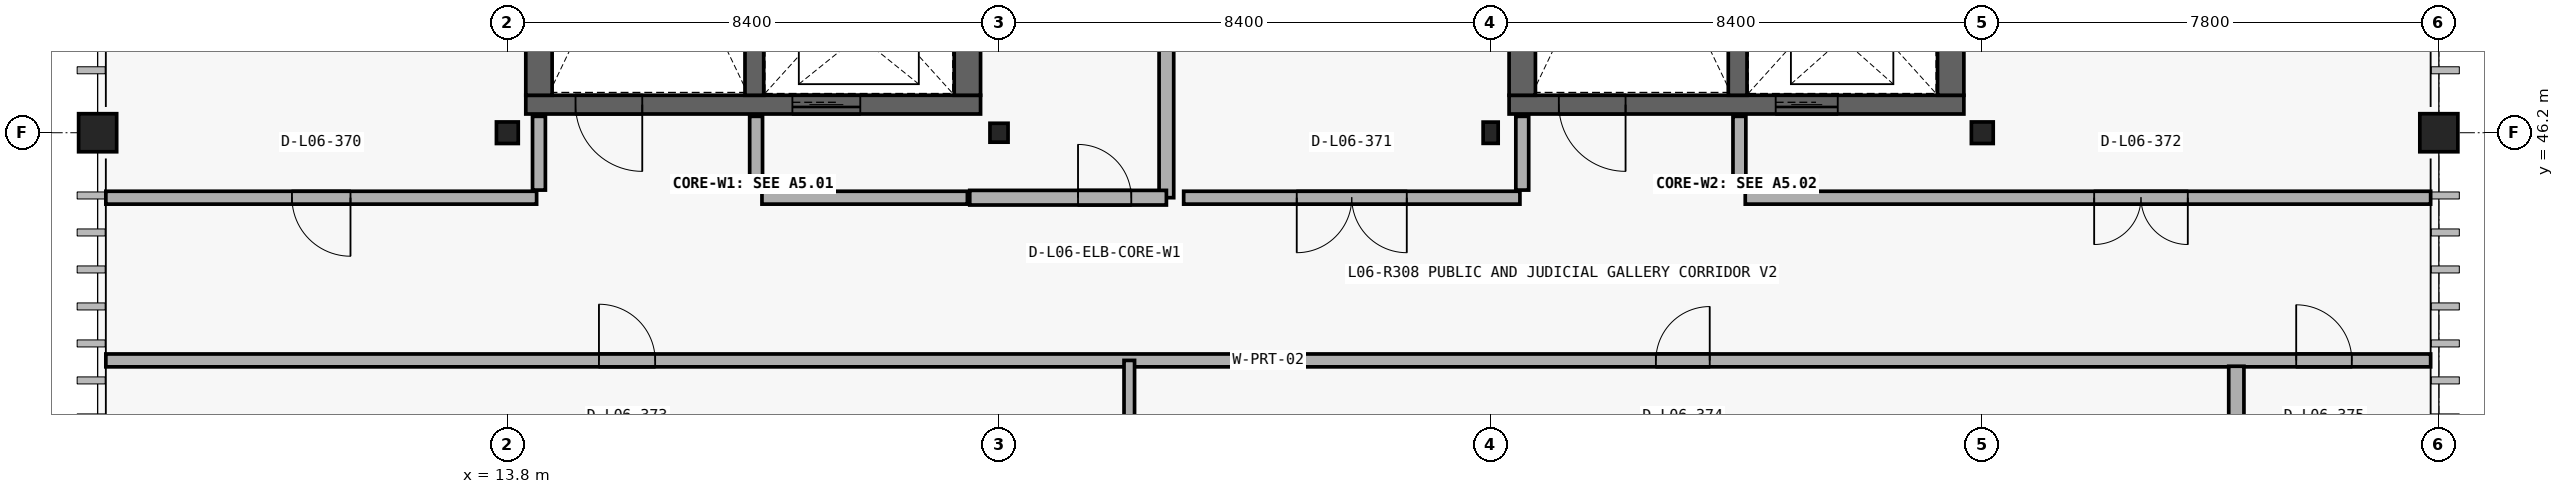
"""IFC4 building model, lengths in metres.
Left out: names, types, materials, properties, quantities, classifications, styles, units other than length and angle.
Written with IfcOpenShell. Run it as: python <this file> out.ifc"""

import sys

from ifc_helpers import new_model, si_unit, direction, frame, frame_2d, origin_with_axes, origin_2d_with_axis, place, context, subcontext, project, spatial, rectangle, circle, i_section, extrude, element, fill, save


model = new_model("IFC4")
c1 = context("Model", 3, precision=1e-05, world=origin_with_axes(), true_north=direction((0.0, 1.0)))
c2 = subcontext(c1, "Body", "Model", "MODEL_VIEW")
j1 = project(units=[si_unit("LENGTHUNIT", "METRE"), si_unit("PLANEANGLEUNIT", "RADIAN")], contexts=[c1])
p1 = place(None, origin_with_axes())
s1 = spatial("IfcSite", under=j1, at=p1, CompositionType="ELEMENT")
p2 = place(p1, origin_with_axes())
s2 = spatial("IfcBuilding", under=s1, at=p2, CompositionType="ELEMENT")
p3 = place(p2, frame((0.0, 0.0, 29.7), z_axis=(0.0, 0.0, 1.0), x_axis=(1.0, 0.0, 0.0)))
s3 = spatial("IfcBuildingStorey", under=s2, at=p3, CompositionType="ELEMENT", Elevation=29.7)
p4 = place(None, frame((14.115, 46.68, 29.7), z_axis=(0.0, 0.0, 1.0), x_axis=(1.0, 0.0, 0.0)))
e1 = element("IfcWall", 1, at=p4, inside=s3, PredefinedType="SHEAR", context=c2, shape_type="SweptSolid", body=[
    extrude(rectangle(XDim=7.77, YDim=0.32, at=frame_2d((3.885, 0.0), x_axis=(1.0, 0.0))), origin_with_axes(), (0.0, 0.0, 1.0), 4.8),
])
p5 = place(None, frame((15.535, 46.68, 29.7), z_axis=(0.0, 0.0, 1.0), x_axis=(1.0, 0.0, 0.0)))
e2 = element("IfcOpeningElement", 2, at=p5, cuts=e1, PredefinedType="OPENING", context=c2, shape_type="SweptSolid", body=[
    extrude(rectangle(XDim=1.14, YDim=2.18, at=frame_2d((0.0, 1.09), x_axis=(1.0, 0.0))), frame((0.0, 0.17, 0.0), z_axis=(0.0, -1.0, 0.0), x_axis=(1.0, 0.0, 0.0)), (0.0, 0.0, 1.0), 0.34),
])
p6 = place(None, frame((19.25, 46.68, 29.7), z_axis=(0.0, 0.0, 1.0), x_axis=(1.0, 0.0, 0.0)))
e3 = element("IfcOpeningElement", 3, at=p6, cuts=e1, PredefinedType="OPENING", context=c2, shape_type="SweptSolid", body=[
    extrude(rectangle(XDim=1.16, YDim=2.2, at=frame_2d((0.0, 1.1), x_axis=(1.0, 0.0))), frame((0.0, 0.17, 0.0), z_axis=(0.0, -1.0, 0.0), x_axis=(1.0, 0.0, 0.0)), (0.0, 0.0, 1.0), 0.34),
])
p7 = place(None, frame((21.66, 46.84, 29.7), z_axis=(0.0, 0.0, 1.0), x_axis=(0.0, 1.0, 0.0)))
e4 = element("IfcWall", 4, at=p7, inside=s3, PredefinedType="SHEAR", context=c2, shape_type="SweptSolid", body=[
    extrude(rectangle(XDim=7.12, YDim=0.45, at=frame_2d((3.56, 0.0), x_axis=(1.0, 0.0))), origin_with_axes(), (0.0, 0.0, 1.0), 4.8),
])
p8 = place(None, frame((21.66, 52.69, 29.7), z_axis=(0.0, 0.0, 1.0), x_axis=(0.0, 1.0, 0.0)))
e5 = element("IfcOpeningElement", 5, at=p8, cuts=e4, PredefinedType="OPENING", context=c2, shape_type="SweptSolid", body=[
    extrude(rectangle(XDim=1.16, YDim=2.2, at=frame_2d((0.0, 1.1), x_axis=(1.0, 0.0))), frame((0.0, 0.235, 0.0), z_axis=(0.0, -1.0, 0.0), x_axis=(1.0, 0.0, 0.0)), (0.0, 0.0, 1.0), 0.47),
])
p9 = place(None, frame((14.34, 53.96, 29.7), z_axis=(0.0, 0.0, 1.0), x_axis=(0.0, -1.0, 0.0)))
e6 = element("IfcWall", 6, at=p9, inside=s3, PredefinedType="SHEAR", context=c2, shape_type="SweptSolid", body=[
    extrude(rectangle(XDim=7.12, YDim=0.45, at=frame_2d((3.56, 0.0), x_axis=(1.0, 0.0))), origin_with_axes(), (0.0, 0.0, 1.0), 4.8),
])
p10 = place(None, frame((18.02, 46.84, 29.7), z_axis=(0.0, 0.0, 1.0), x_axis=(0.0, 1.0, 0.0)))
e7 = element("IfcWall", 7, at=p10, inside=s3, PredefinedType="SHEAR", context=c2, shape_type="SweptSolid", body=[
    extrude(rectangle(XDim=7.12, YDim=0.32, at=frame_2d((3.56, 0.0), x_axis=(1.0, 0.0))), origin_with_axes(), (0.0, 0.0, 1.0), 4.8),
])
p11 = place(None, frame((25.06, 45.09, 29.7), z_axis=(0.0, 0.0, 1.0), x_axis=(0.0, 1.0, 0.0)))
e8 = element("IfcWall", 8, at=p11, inside=s3, PredefinedType="PARTITIONING", context=c2, shape_type="SweptSolid", body=[
    extrude(rectangle(XDim=9.03, YDim=0.25, at=frame_2d((4.515, 0.0), x_axis=(1.0, 0.0))), origin_with_axes(), (0.0, 0.0, 1.0), 4.48),
])
p12 = place(None, frame((21.7, 45.09, 29.7), z_axis=(0.0, 0.0, 1.0), x_axis=(1.0, 0.0, 0.0)))
e9 = element("IfcWall", 9, at=p12, inside=s3, PredefinedType="PARTITIONING", context=c2, shape_type="SweptSolid", body=[
    extrude(rectangle(XDim=3.36, YDim=0.25, at=frame_2d((1.68, 0.0), x_axis=(1.0, 0.0))), origin_with_axes(), (0.0, 0.0, 1.0), 4.48),
])
p13 = place(None, frame((24.005, 45.09, 29.7), z_axis=(0.0, 0.0, 1.0), x_axis=(1.0, 0.0, 0.0)))
e10 = element("IfcOpeningElement", 10, at=p13, cuts=e9, PredefinedType="OPENING", context=c2, shape_type="SweptSolid", body=[
    extrude(rectangle(XDim=0.91, YDim=2.12, at=frame_2d((0.0, 1.06), x_axis=(1.0, 0.0))), frame((0.0, 0.135, 0.0), z_axis=(0.0, -1.0, 0.0), x_axis=(1.0, 0.0, 0.0)), (0.0, 0.0, 1.0), 0.27),
])
p14 = place(None, frame((30.915, 46.68, 29.7), z_axis=(0.0, 0.0, 1.0), x_axis=(1.0, 0.0, 0.0)))
e11 = element("IfcWall", 11, at=p14, inside=s3, PredefinedType="SHEAR", context=c2, shape_type="SweptSolid", body=[
    extrude(rectangle(XDim=7.77, YDim=0.32, at=frame_2d((3.885, 0.0), x_axis=(1.0, 0.0))), origin_with_axes(), (0.0, 0.0, 1.0), 4.8),
])
p15 = place(None, frame((32.335, 46.68, 29.7), z_axis=(0.0, 0.0, 1.0), x_axis=(1.0, 0.0, 0.0)))
e12 = element("IfcOpeningElement", 12, at=p15, cuts=e11, PredefinedType="OPENING", context=c2, shape_type="SweptSolid", body=[
    extrude(rectangle(XDim=1.14, YDim=2.18, at=frame_2d((0.0, 1.09), x_axis=(1.0, 0.0))), frame((0.0, 0.17, 0.0), z_axis=(0.0, -1.0, 0.0), x_axis=(1.0, 0.0, 0.0)), (0.0, 0.0, 1.0), 0.34),
])
p16 = place(None, frame((36.0, 46.68, 29.7), z_axis=(0.0, 0.0, 1.0), x_axis=(1.0, 0.0, 0.0)))
e13 = element("IfcOpeningElement", 13, at=p16, cuts=e11, PredefinedType="OPENING", context=c2, shape_type="SweptSolid", body=[
    extrude(rectangle(XDim=1.06, YDim=2.16, at=frame_2d((0.0, 1.08), x_axis=(1.0, 0.0))), frame((0.0, 0.17, 0.0), z_axis=(0.0, -1.0, 0.0), x_axis=(1.0, 0.0, 0.0)), (0.0, 0.0, 1.0), 0.34),
])
for number, where, z_axis, x_axis in (
    (14, (38.46, 46.84, 29.7), (0.0, 0.0, 1.0), (0.0, 1.0, 0.0)),
    (15, (31.14, 53.96, 29.7), (0.0, 0.0, 1.0), (0.0, -1.0, 0.0)),
):
    element("IfcWall", number, at=place(None, frame(where, z_axis=z_axis, x_axis=x_axis)), inside=s3, PredefinedType="SHEAR", context=c2, shape_type="SweptSolid", body=[
        extrude(rectangle(XDim=7.12, YDim=0.45, at=frame_2d((3.56, 0.0), x_axis=(1.0, 0.0))), origin_with_axes(), (0.0, 0.0, 1.0), 4.8),
    ])
p17 = place(None, frame((34.82, 46.84, 29.7), z_axis=(0.0, 0.0, 1.0), x_axis=(0.0, 1.0, 0.0)))
e16 = element("IfcWall", 16, at=p17, inside=s3, PredefinedType="SHEAR", context=c2, shape_type="SweptSolid", body=[
    extrude(rectangle(XDim=7.12, YDim=0.32, at=frame_2d((3.56, 0.0), x_axis=(1.0, 0.0))), origin_with_axes(), (0.0, 0.0, 1.0), 4.8),
])
for number, where, z_axis, x_axis in (
    (17, (14.34, 45.22, 29.7), (0.0, 0.0, 1.0), (0.0, 1.0, 0.0)),
    (18, (18.05, 45.22, 29.7), (0.0, 0.0, 1.0), (0.0, 1.0, 0.0)),
    (19, (31.14, 45.22, 29.7), (0.0, 0.0, 1.0), (0.0, 1.0, 0.0)),
    (20, (34.85, 45.22, 29.7), (0.0, 0.0, 1.0), (0.0, 1.0, 0.0)),
):
    element("IfcWall", number, at=place(None, frame(where, z_axis=z_axis, x_axis=x_axis)), inside=s3, PredefinedType="PARTITIONING", context=c2, shape_type="SweptSolid", body=[
        extrude(rectangle(XDim=1.26, YDim=0.22, at=frame_2d((0.63, 0.0), x_axis=(1.0, 0.0))), origin_with_axes(), (0.0, 0.0, 1.0), 4.48),
    ])
p18 = place(None, frame((6.94, 45.09, 29.7), z_axis=(0.0, 0.0, 1.0), x_axis=(1.0, 0.0, 0.0)))
e21 = element("IfcWall", 21, at=p18, inside=s3, PredefinedType="PARTITIONING", context=c2, shape_type="SweptSolid", body=[
    extrude(rectangle(XDim=7.36, YDim=0.22, at=frame_2d((3.68, 0.0), x_axis=(1.0, 0.0))), origin_with_axes(), (0.0, 0.0, 1.0), 4.48),
])
p19 = place(None, frame((10.62, 45.09, 29.7), z_axis=(0.0, 0.0, 1.0), x_axis=(1.0, 0.0, 0.0)))
e22 = element("IfcOpeningElement", 22, at=p19, cuts=e21, PredefinedType="OPENING", context=c2, shape_type="SweptSolid", body=[
    extrude(rectangle(XDim=1.0, YDim=2.28, at=frame_2d((0.0, 1.14), x_axis=(1.0, 0.0))), frame((0.0, 0.12, 0.0), z_axis=(0.0, -1.0, 0.0), x_axis=(1.0, 0.0, 0.0)), (0.0, 0.0, 1.0), 0.24),
])
p20 = place(None, frame((18.15, 45.09, 29.7), z_axis=(0.0, 0.0, 1.0), x_axis=(1.0, 0.0, 0.0)))
e23 = element("IfcWall", 23, at=p20, inside=s3, PredefinedType="PARTITIONING", context=c2, shape_type="SweptSolid", body=[
    extrude(rectangle(XDim=3.51, YDim=0.22, at=frame_2d((1.755, 0.0), x_axis=(1.0, 0.0))), origin_with_axes(), (0.0, 0.0, 1.0), 4.48),
])
p21 = place(None, frame((25.355, 45.09, 29.7), z_axis=(0.0, 0.0, 1.0), x_axis=(1.0, 0.0, 0.0)))
e24 = element("IfcWall", 24, at=p21, inside=s3, PredefinedType="PARTITIONING", context=c2, shape_type="SweptSolid", body=[
    extrude(rectangle(XDim=5.745, YDim=0.22, at=frame_2d((2.873, 0.0), x_axis=(1.0, 0.0))), origin_with_axes(), (0.0, 0.0, 1.0), 4.48),
])
p22 = place(None, frame((28.227, 45.09, 29.7), z_axis=(0.0, 0.0, 1.0), x_axis=(1.0, 0.0, 0.0)))
e25 = element("IfcOpeningElement", 25, at=p22, cuts=e24, PredefinedType="OPENING", context=c2, shape_type="SweptSolid", body=[
    extrude(rectangle(XDim=1.88, YDim=2.56, at=frame_2d((0.0, 1.28), x_axis=(1.0, 0.0))), frame((0.0, 0.12, 0.0), z_axis=(0.0, -1.0, 0.0), x_axis=(1.0, 0.0, 0.0)), (0.0, 0.0, 1.0), 0.24),
])
p23 = place(None, frame((34.95, 45.09, 29.7), z_axis=(0.0, 0.0, 1.0), x_axis=(1.0, 0.0, 0.0)))
e26 = element("IfcWall", 26, at=p23, inside=s3, PredefinedType="PARTITIONING", context=c2, shape_type="SweptSolid", body=[
    extrude(rectangle(XDim=11.71, YDim=0.22, at=frame_2d((5.855, 0.0), x_axis=(1.0, 0.0))), origin_with_axes(), (0.0, 0.0, 1.0), 4.48),
])
p24 = place(None, frame((41.711, 45.09, 29.7), z_axis=(0.0, 0.0, 1.0), x_axis=(1.0, 0.0, 0.0)))
e27 = element("IfcOpeningElement", 27, at=p24, cuts=e26, PredefinedType="OPENING", context=c2, shape_type="SweptSolid", body=[
    extrude(rectangle(XDim=1.6, YDim=2.32, at=frame_2d((0.0, 1.16), x_axis=(1.0, 0.0))), frame((0.0, 0.12, 0.0), z_axis=(0.0, -1.0, 0.0), x_axis=(1.0, 0.0, 0.0)), (0.0, 0.0, 1.0), 0.24),
])
p25 = place(None, frame((6.94, 42.31, 29.7), z_axis=(0.0, 0.0, 1.0), x_axis=(1.0, 0.0, 0.0)))
e28 = element("IfcWall", 28, at=p25, inside=s3, PredefinedType="PARTITIONING", context=c2, shape_type="SweptSolid", body=[
    extrude(rectangle(XDim=39.72, YDim=0.22, at=frame_2d((19.86, 0.0), x_axis=(1.0, 0.0))), origin_with_axes(), (0.0, 0.0, 1.0), 4.48),
])
p26 = place(None, frame((15.845, 42.31, 29.7), z_axis=(0.0, 0.0, 1.0), x_axis=(1.0, 0.0, 0.0)))
e29 = element("IfcOpeningElement", 29, at=p26, cuts=e28, PredefinedType="OPENING", context=c2, shape_type="SweptSolid", body=[
    extrude(rectangle(XDim=0.96, YDim=2.2, at=frame_2d((0.0, 1.1), x_axis=(1.0, 0.0))), frame((0.0, 0.12, 0.0), z_axis=(0.0, -1.0, 0.0), x_axis=(1.0, 0.0, 0.0)), (0.0, 0.0, 1.0), 0.24),
])
p27 = place(None, frame((33.883, 42.31, 29.7), z_axis=(0.0, 0.0, 1.0), x_axis=(1.0, 0.0, 0.0)))
e30 = element("IfcOpeningElement", 30, at=p27, cuts=e28, PredefinedType="OPENING", context=c2, shape_type="SweptSolid", body=[
    extrude(rectangle(XDim=0.92, YDim=2.14, at=frame_2d((0.0, 1.07), x_axis=(1.0, 0.0))), frame((0.0, 0.12, 0.0), z_axis=(0.0, -1.0, 0.0), x_axis=(1.0, 0.0, 0.0)), (0.0, 0.0, 1.0), 0.24),
])
p28 = place(None, frame((44.838, 42.31, 29.7), z_axis=(0.0, 0.0, 1.0), x_axis=(1.0, 0.0, 0.0)))
e31 = element("IfcOpeningElement", 31, at=p28, cuts=e28, PredefinedType="OPENING", context=c2, shape_type="SweptSolid", body=[
    extrude(rectangle(XDim=0.95, YDim=2.1, at=frame_2d((0.0, 1.05), x_axis=(1.0, 0.0))), frame((0.0, 0.12, 0.0), z_axis=(0.0, -1.0, 0.0), x_axis=(1.0, 0.0, 0.0)), (0.0, 0.0, 1.0), 0.24),
])
p29 = place(None, frame((43.34, 30.78, 29.7), z_axis=(0.0, 0.0, 1.0), x_axis=(0.0, 1.0, 0.0)))
e32 = element("IfcWall", 32, at=p29, inside=s3, PredefinedType="PLUMBINGWALL", context=c2, shape_type="SweptSolid", body=[
    extrude(rectangle(XDim=11.43, YDim=0.26, at=frame_2d((5.715, 0.0), x_axis=(1.0, 0.0))), origin_with_axes(), (0.0, 0.0, 1.0), 4.48),
])
p30 = place(None, frame((24.426, 30.74, 29.7), z_axis=(0.0, 0.0, 1.0), x_axis=(0.0, 1.0, 0.0)))
e33 = element("IfcWall", 33, at=p30, inside=s3, PredefinedType="PARTITIONING", context=c2, shape_type="SweptSolid", body=[
    extrude(rectangle(XDim=11.57, YDim=0.18, at=frame_2d((5.785, 0.0), x_axis=(1.0, 0.0))), origin_with_axes(), (0.0, 0.0, 1.0), 4.48),
])
p31 = place(None, frame((6.8, 46.2, 29.7), z_axis=(0.0, 0.0, 1.0), x_axis=(1.0, 0.0, 0.0)))
e34 = element("IfcColumn", 34, at=p31, inside=s3, PredefinedType="COLUMN", context=c2, shape_type="SweptSolid", body=[
    extrude(circle(Radius=0.325, at=origin_2d_with_axis()), origin_with_axes(), (0.0, 0.0, 1.0), 4.8),
])
p32 = place(None, frame((13.8, 46.2, 29.7), z_axis=(0.0, 0.0, 1.0), x_axis=(1.0, 0.0, 0.0)))
e35 = element("IfcColumn", 35, at=p32, inside=s3, PredefinedType="COLUMN", context=c2, shape_type="SweptSolid", body=[
    extrude(i_section(OverallWidth=0.373, OverallDepth=0.368, WebThickness=0.015, FlangeThickness=0.024, at=origin_2d_with_axis()), origin_with_axes(), (0.0, 0.0, 1.0), 4.8),
])
p33 = place(None, frame((22.2, 46.2, 29.7), z_axis=(0.0, 0.0, 1.0), x_axis=(1.0, 0.0, 0.0)))
e36 = element("IfcColumn", 36, at=p33, inside=s3, PredefinedType="COLUMN", context=c2, shape_type="SweptSolid", body=[
    extrude(i_section(OverallWidth=0.309, OverallDepth=0.323, WebThickness=0.014, FlangeThickness=0.023, at=origin_2d_with_axis()), origin_with_axes(), (0.0, 0.0, 1.0), 4.8),
])
p34 = place(None, frame((30.6, 46.2, 29.7), z_axis=(0.0, 0.0, 1.0), x_axis=(1.0, 0.0, 0.0)))
e37 = element("IfcColumn", 37, at=p34, inside=s3, PredefinedType="COLUMN", context=c2, shape_type="SweptSolid", body=[
    extrude(i_section(OverallWidth=0.257, OverallDepth=0.363, WebThickness=0.013, FlangeThickness=0.022, at=origin_2d_with_axis()), origin_with_axes(), (0.0, 0.0, 1.0), 4.8),
])
p35 = place(None, frame((39.0, 46.2, 29.7), z_axis=(0.0, 0.0, 1.0), x_axis=(1.0, 0.0, 0.0)))
e38 = element("IfcColumn", 38, at=p35, inside=s3, PredefinedType="COLUMN", context=c2, shape_type="SweptSolid", body=[
    extrude(i_section(OverallWidth=0.373, OverallDepth=0.368, WebThickness=0.015, FlangeThickness=0.024, at=origin_2d_with_axis()), origin_with_axes(), (0.0, 0.0, 1.0), 4.8),
])
p36 = place(None, frame((46.8, 46.2, 29.7), z_axis=(0.0, 0.0, 1.0), x_axis=(1.0, 0.0, 0.0)))
e39 = element("IfcColumn", 39, at=p36, inside=s3, PredefinedType="COLUMN", context=c2, shape_type="SweptSolid", body=[
    extrude(circle(Radius=0.325, at=origin_2d_with_axis()), origin_with_axes(), (0.0, 0.0, 1.0), 4.8),
])
p37 = place(None, frame((15.535, 46.68, 29.7), z_axis=(0.0, 0.0, 1.0), x_axis=(-1.0, 0.0, 0.0)))
e40 = element("IfcDoor", 40, at=p37, inside=s3, OperationType="SINGLE_SWING_RIGHT", PredefinedType="DOOR", context=c2, shape_type="SweptSolid", body=[
    extrude(rectangle(XDim=1.14, YDim=2.18, at=frame_2d((0.0, 1.09), x_axis=(1.0, 0.0))), frame((0.0, 0.04, 0.0), z_axis=(0.0, -1.0, 0.0), x_axis=(1.0, 0.0, 0.0)), (0.0, 0.0, 1.0), 0.08),
])
fill(e2, e40)
p38 = place(None, frame((19.25, 46.68, 29.7), z_axis=(0.0, 0.0, 1.0), x_axis=(-1.0, 0.0, 0.0)))
e41 = element("IfcDoor", 41, at=p38, inside=s3, OperationType="SLIDING_TO_LEFT", PredefinedType="DOOR", context=c2, shape_type="SweptSolid", body=[
    extrude(rectangle(XDim=1.16, YDim=2.2, at=frame_2d((0.0, 1.1), x_axis=(1.0, 0.0))), frame((0.0, 0.04, 0.0), z_axis=(0.0, -1.0, 0.0), x_axis=(1.0, 0.0, 0.0)), (0.0, 0.0, 1.0), 0.08),
])
fill(e3, e41)
p39 = place(None, frame((24.005, 45.09, 29.7), z_axis=(0.0, 0.0, 1.0), x_axis=(1.0, 0.0, 0.0)))
e42 = element("IfcDoor", 42, at=p39, inside=s3, OperationType="SINGLE_SWING_LEFT", PredefinedType="DOOR", context=c2, shape_type="SweptSolid", body=[
    extrude(rectangle(XDim=0.91, YDim=2.12, at=frame_2d((0.0, 1.06), x_axis=(1.0, 0.0))), frame((0.0, 0.04, 0.0), z_axis=(0.0, -1.0, 0.0), x_axis=(1.0, 0.0, 0.0)), (0.0, 0.0, 1.0), 0.08),
])
fill(e10, e42)
p40 = place(None, frame((32.335, 46.68, 29.7), z_axis=(0.0, 0.0, 1.0), x_axis=(-1.0, 0.0, 0.0)))
e43 = element("IfcDoor", 43, at=p40, inside=s3, OperationType="SINGLE_SWING_RIGHT", PredefinedType="DOOR", context=c2, shape_type="SweptSolid", body=[
    extrude(rectangle(XDim=1.14, YDim=2.18, at=frame_2d((0.0, 1.09), x_axis=(1.0, 0.0))), frame((0.0, 0.04, 0.0), z_axis=(0.0, -1.0, 0.0), x_axis=(1.0, 0.0, 0.0)), (0.0, 0.0, 1.0), 0.08),
])
fill(e12, e43)
p41 = place(None, frame((36.0, 46.68, 29.7), z_axis=(0.0, 0.0, 1.0), x_axis=(-1.0, 0.0, 0.0)))
e44 = element("IfcDoor", 44, at=p41, inside=s3, OperationType="SLIDING_TO_LEFT", PredefinedType="DOOR", context=c2, shape_type="SweptSolid", body=[
    extrude(rectangle(XDim=1.06, YDim=2.16, at=frame_2d((0.0, 1.08), x_axis=(1.0, 0.0))), frame((0.0, 0.04, 0.0), z_axis=(0.0, -1.0, 0.0), x_axis=(1.0, 0.0, 0.0)), (0.0, 0.0, 1.0), 0.08),
])
fill(e13, e44)
p42 = place(None, frame((10.62, 45.09, 29.7), z_axis=(0.0, 0.0, 1.0), x_axis=(-1.0, 0.0, 0.0)))
e45 = element("IfcDoor", 45, at=p42, inside=s3, OperationType="SINGLE_SWING_RIGHT", PredefinedType="DOOR", context=c2, shape_type="SweptSolid", body=[
    extrude(rectangle(XDim=1.0, YDim=2.28, at=frame_2d((0.0, 1.14), x_axis=(1.0, 0.0))), frame((0.0, 0.04, 0.0), z_axis=(0.0, -1.0, 0.0), x_axis=(1.0, 0.0, 0.0)), (0.0, 0.0, 1.0), 0.08),
])
fill(e22, e45)
p43 = place(None, frame((28.227, 45.09, 29.7), z_axis=(0.0, 0.0, 1.0), x_axis=(-1.0, 0.0, 0.0)))
e46 = element("IfcDoor", 46, at=p43, inside=s3, OperationType="DOUBLE_DOOR_SINGLE_SWING", PredefinedType="DOOR", context=c2, shape_type="SweptSolid", body=[
    extrude(rectangle(XDim=1.88, YDim=2.56, at=frame_2d((0.0, 1.28), x_axis=(1.0, 0.0))), frame((0.0, 0.04, 0.0), z_axis=(0.0, -1.0, 0.0), x_axis=(1.0, 0.0, 0.0)), (0.0, 0.0, 1.0), 0.08),
])
fill(e25, e46)
p44 = place(None, frame((41.711, 45.09, 29.7), z_axis=(0.0, 0.0, 1.0), x_axis=(-1.0, 0.0, 0.0)))
e47 = element("IfcDoor", 47, at=p44, inside=s3, OperationType="DOUBLE_DOOR_SINGLE_SWING", PredefinedType="DOOR", context=c2, shape_type="SweptSolid", body=[
    extrude(rectangle(XDim=1.6, YDim=2.32, at=frame_2d((0.0, 1.16), x_axis=(1.0, 0.0))), frame((0.0, 0.04, 0.0), z_axis=(0.0, -1.0, 0.0), x_axis=(1.0, 0.0, 0.0)), (0.0, 0.0, 1.0), 0.08),
])
fill(e27, e47)
p45 = place(None, frame((15.845, 42.31, 29.7), z_axis=(0.0, 0.0, 1.0), x_axis=(1.0, 0.0, 0.0)))
e48 = element("IfcDoor", 48, at=p45, inside=s3, OperationType="SINGLE_SWING_LEFT", PredefinedType="DOOR", context=c2, shape_type="SweptSolid", body=[
    extrude(rectangle(XDim=0.96, YDim=2.2, at=frame_2d((0.0, 1.1), x_axis=(1.0, 0.0))), frame((0.0, 0.04, 0.0), z_axis=(0.0, -1.0, 0.0), x_axis=(1.0, 0.0, 0.0)), (0.0, 0.0, 1.0), 0.08),
])
fill(e29, e48)
p46 = place(None, frame((33.883, 42.31, 29.7), z_axis=(0.0, 0.0, 1.0), x_axis=(1.0, 0.0, 0.0)))
e49 = element("IfcDoor", 49, at=p46, inside=s3, OperationType="SINGLE_SWING_RIGHT", PredefinedType="DOOR", context=c2, shape_type="SweptSolid", body=[
    extrude(rectangle(XDim=0.92, YDim=2.14, at=frame_2d((0.0, 1.07), x_axis=(1.0, 0.0))), frame((0.0, 0.04, 0.0), z_axis=(0.0, -1.0, 0.0), x_axis=(1.0, 0.0, 0.0)), (0.0, 0.0, 1.0), 0.08),
])
fill(e30, e49)
p47 = place(None, frame((44.838, 42.31, 29.7), z_axis=(0.0, 0.0, 1.0), x_axis=(1.0, 0.0, 0.0)))
e50 = element("IfcDoor", 50, at=p47, inside=s3, OperationType="SINGLE_SWING_LEFT", PredefinedType="DOOR", context=c2, shape_type="SweptSolid", body=[
    extrude(rectangle(XDim=0.95, YDim=2.1, at=frame_2d((0.0, 1.05), x_axis=(1.0, 0.0))), frame((0.0, 0.04, 0.0), z_axis=(0.0, -1.0, 0.0), x_axis=(1.0, 0.0, 0.0)), (0.0, 0.0, 1.0), 0.08),
])
fill(e31, e50)
save(model, sys.argv[1])
